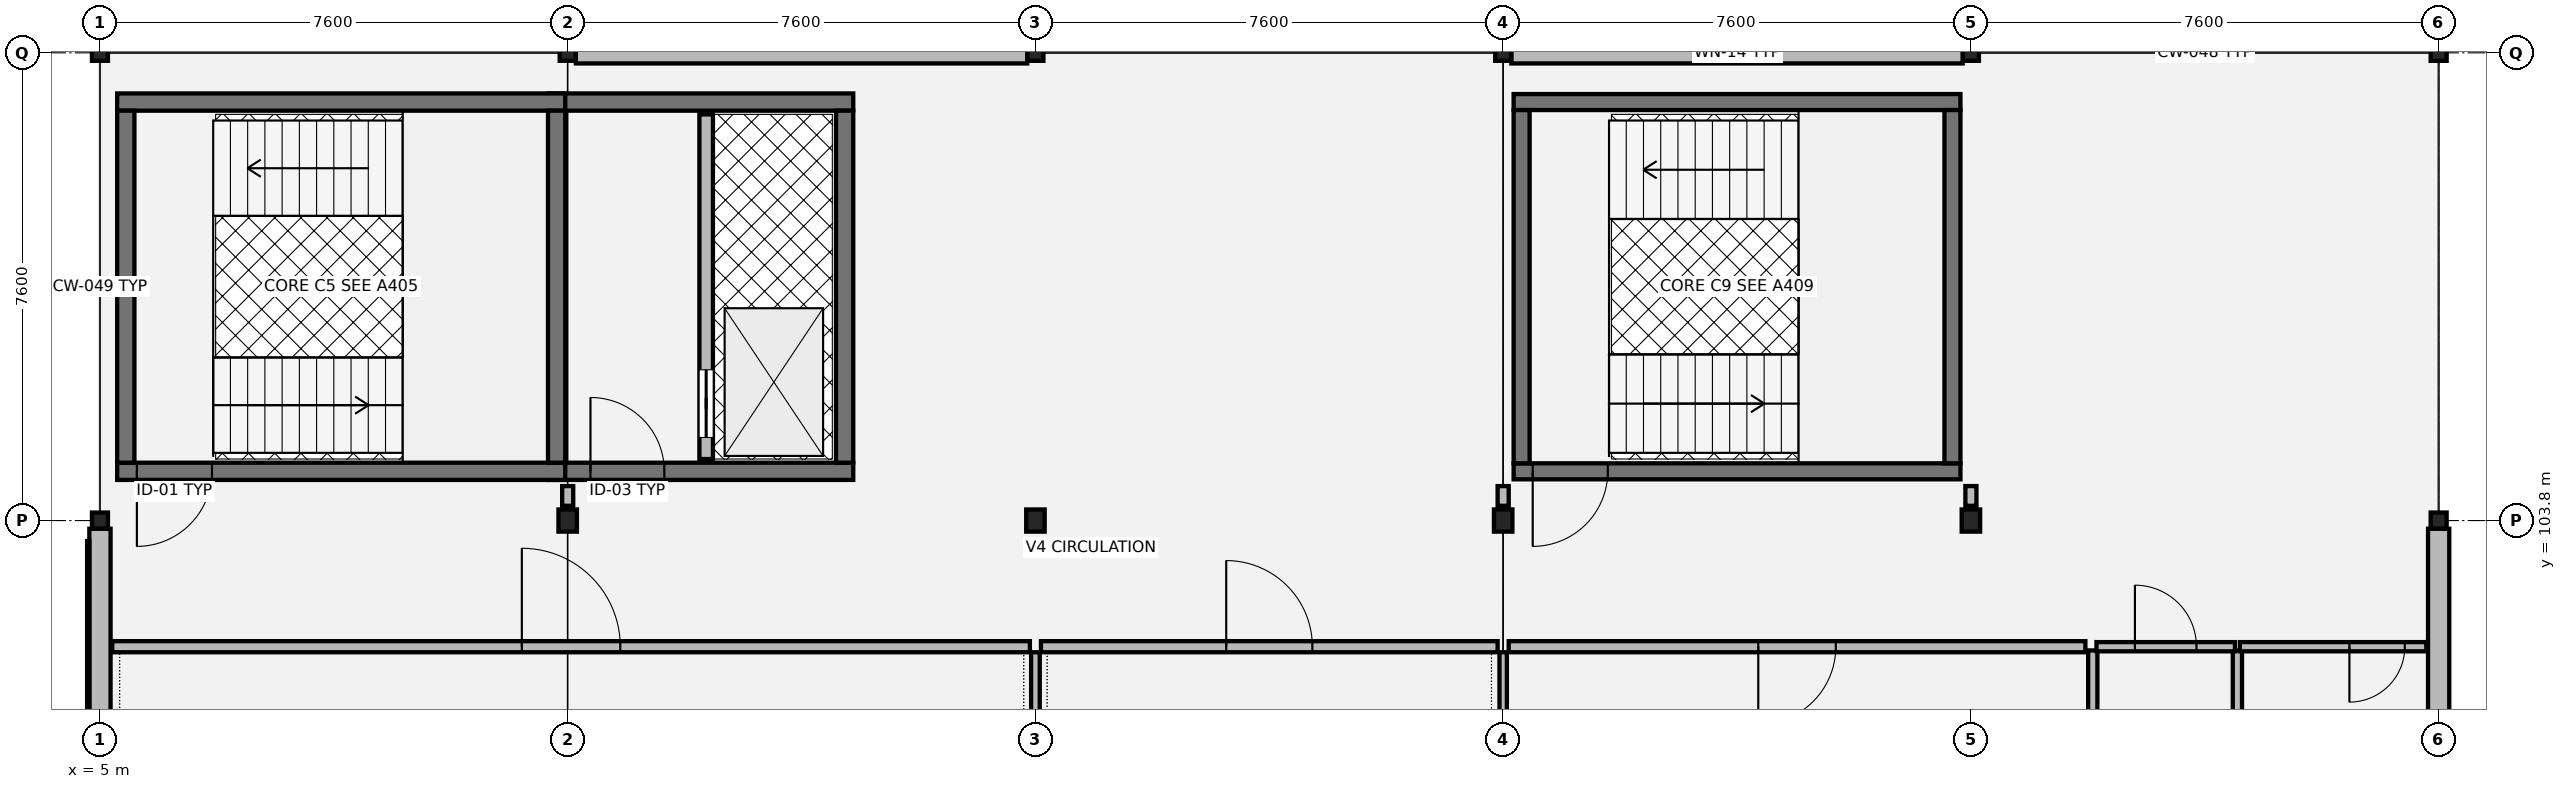
"""IFC4 building model, lengths in metres.
Left out: names, types, materials, properties, quantities, classifications, styles, units other than length and angle.
Written with IfcOpenShell. Run it as: python <this file> out.ifc"""

import sys

from ifc_helpers import new_model, si_unit, direction, frame, frame_2d, origin, origin_2d, place, context, subcontext, project, spatial, rectangle, hollow_rectangle, i_section, extrude, element, fill, save


model = new_model("IFC4")
c1 = context("Model", 3, precision=1e-05, world=origin(), true_north=direction((0.0, 1.0)))
c2 = subcontext(c1, "Body", "Model", "MODEL_VIEW")
j1 = project(units=[si_unit("LENGTHUNIT", "METRE"), si_unit("PLANEANGLEUNIT", "RADIAN")], contexts=[c1])
p1 = place(None, origin())
s1 = spatial("IfcSite", under=j1, at=p1, CompositionType="ELEMENT")
p2 = place(p1, origin())
s2 = spatial("IfcBuilding", under=s1, at=p2, CompositionType="ELEMENT")
p3 = place(p2, frame((0.0, 0.0, 9.18)))
s3 = spatial("IfcBuildingStorey", under=s2, at=p3, CompositionType="ELEMENT", Elevation=9.18)
for number, where, z_axis, x_axis in (
    (1, (5.0, 103.8, 0.0), (0.0, 0.0, 1.0), (1.0, 0.0, 0.0)),
    (2, (5.0, 111.4, 0.0), (0.0, 0.0, 1.0), (1.0, 0.0, 0.0)),
):
    element("IfcColumn", number, at=place(p3, frame(where, z_axis=z_axis, x_axis=x_axis)), inside=s3, PredefinedType="COLUMN", context=c2, shape_type="SweptSolid", body=[
        extrude(hollow_rectangle(XDim=0.26, YDim=0.26, WallThickness=0.012, at=origin_2d()), origin(), (0.0, 0.0, 1.0), 4.055),
    ])
p4 = place(p3, frame((12.6, 103.8, 0.0), z_axis=(0.0, 0.0, 1.0), x_axis=(1.0, 0.0, 0.0)))
e3 = element("IfcColumn", 3, at=p4, inside=s3, PredefinedType="COLUMN", context=c2, shape_type="SweptSolid", body=[
    extrude(i_section(OverallWidth=0.3, OverallDepth=0.36, WebThickness=0.012, FlangeThickness=0.022, at=origin_2d()), origin(), (0.0, 0.0, 1.0), 4.055),
])
p5 = place(p3, frame((12.6, 111.4, 0.0), z_axis=(0.0, 0.0, 1.0), x_axis=(1.0, 0.0, 0.0)))
e4 = element("IfcColumn", 4, at=p5, inside=s3, PredefinedType="COLUMN", context=c2, shape_type="SweptSolid", body=[
    extrude(hollow_rectangle(XDim=0.26, YDim=0.26, WallThickness=0.012, at=origin_2d()), origin(), (0.0, 0.0, 1.0), 4.055),
])
p6 = place(p3, frame((20.2, 103.8, 0.0), z_axis=(0.0, 0.0, 1.0), x_axis=(1.0, 0.0, 0.0)))
e5 = element("IfcColumn", 5, at=p6, inside=s3, PredefinedType="COLUMN", context=c2, shape_type="SweptSolid", body=[
    extrude(i_section(OverallWidth=0.3, OverallDepth=0.36, WebThickness=0.012, FlangeThickness=0.022, at=origin_2d()), origin(), (0.0, 0.0, 1.0), 4.055),
])
p7 = place(p3, frame((20.2, 111.4, 0.0), z_axis=(0.0, 0.0, 1.0), x_axis=(1.0, 0.0, 0.0)))
e6 = element("IfcColumn", 6, at=p7, inside=s3, PredefinedType="COLUMN", context=c2, shape_type="SweptSolid", body=[
    extrude(hollow_rectangle(XDim=0.26, YDim=0.26, WallThickness=0.012, at=origin_2d()), origin(), (0.0, 0.0, 1.0), 4.055),
])
p8 = place(p3, frame((27.8, 103.8, 0.0), z_axis=(0.0, 0.0, 1.0), x_axis=(1.0, 0.0, 0.0)))
e7 = element("IfcColumn", 7, at=p8, inside=s3, PredefinedType="COLUMN", context=c2, shape_type="SweptSolid", body=[
    extrude(i_section(OverallWidth=0.3, OverallDepth=0.36, WebThickness=0.012, FlangeThickness=0.022, at=origin_2d()), origin(), (0.0, 0.0, 1.0), 4.055),
])
p9 = place(p3, frame((27.8, 111.4, 0.0), z_axis=(0.0, 0.0, 1.0), x_axis=(1.0, 0.0, 0.0)))
e8 = element("IfcColumn", 8, at=p9, inside=s3, PredefinedType="COLUMN", context=c2, shape_type="SweptSolid", body=[
    extrude(hollow_rectangle(XDim=0.26, YDim=0.26, WallThickness=0.012, at=origin_2d()), origin(), (0.0, 0.0, 1.0), 4.055),
])
p10 = place(p3, frame((35.4, 103.8, 0.0), z_axis=(0.0, 0.0, 1.0), x_axis=(1.0, 0.0, 0.0)))
e9 = element("IfcColumn", 9, at=p10, inside=s3, PredefinedType="COLUMN", context=c2, shape_type="SweptSolid", body=[
    extrude(i_section(OverallWidth=0.3, OverallDepth=0.36, WebThickness=0.012, FlangeThickness=0.022, at=origin_2d()), origin(), (0.0, 0.0, 1.0), 4.055),
])
for number, where, z_axis, x_axis in (
    (10, (35.4, 111.4, 0.0), (0.0, 0.0, 1.0), (1.0, 0.0, 0.0)),
    (11, (43.0, 103.8, 0.0), (0.0, 0.0, 1.0), (1.0, 0.0, 0.0)),
    (12, (43.0, 111.4, 0.0), (0.0, 0.0, 1.0), (1.0, 0.0, 0.0)),
):
    element("IfcColumn", number, at=place(p3, frame(where, z_axis=z_axis, x_axis=x_axis)), inside=s3, PredefinedType="COLUMN", context=c2, shape_type="SweptSolid", body=[
        extrude(hollow_rectangle(XDim=0.26, YDim=0.26, WallThickness=0.012, at=origin_2d()), origin(), (0.0, 0.0, 1.0), 4.055),
    ])
p11 = place(p3, frame((43.0, 96.333, 0.0), z_axis=(0.0, 0.0, 1.0), x_axis=(0.0, 1.0, 0.0)))
e13 = element("IfcWall", 13, at=p11, inside=s3, PredefinedType="SOLIDWALL", context=c2, shape_type="SweptSolid", body=[
    extrude(rectangle(XDim=7.334, YDim=0.345, at=frame_2d((3.667, 0.0))), origin(), (0.0, 0.0, 1.0), 3.48),
])
p12 = place(p3, frame((35.267, 111.4, 0.0), z_axis=(0.0, 0.0, 1.0), x_axis=(-1.0, 0.0, 0.0)))
e14 = element("IfcWall", 14, at=p12, inside=s3, PredefinedType="SOLIDWALL", context=c2, shape_type="SweptSolid", body=[
    extrude(rectangle(XDim=7.334, YDim=0.345, at=frame_2d((3.667, 0.0))), origin(), (0.0, 0.0, 1.0), 3.48),
])
p13 = place(p12, frame((3.117, 0.0, 0.8)))
e15 = element("IfcOpeningElement", 15, at=p13, cuts=e14, PredefinedType="OPENING", context=c2, shape_type="SweptSolid", body=[
    extrude(rectangle(XDim=1.1, YDim=2.05, at=frame_2d((0.55, 1.025))), frame((0.0, 0.182, 0.0), z_axis=(0.0, -1.0, 0.0), x_axis=(1.0, 0.0, 0.0)), (0.0, 0.0, 1.0), 0.365),
])
for number, where, z_axis, x_axis in (
    (16, (20.067, 111.4, 0.0), (0.0, 0.0, 1.0), (-1.0, 0.0, 0.0)),
    (17, (5.0, 103.667, 0.0), (0.0, 0.0, 1.0), (0.0, -1.0, 0.0)),
):
    element("IfcWall", number, at=place(p3, frame(where, z_axis=z_axis, x_axis=x_axis)), inside=s3, PredefinedType="SOLIDWALL", context=c2, shape_type="SweptSolid", body=[
        extrude(rectangle(XDim=7.334, YDim=0.345, at=frame_2d((3.667, 0.0))), origin(), (0.0, 0.0, 1.0), 3.48),
    ])
p14 = place(p3, frame((12.28, 104.6, 0.0), z_axis=(0.0, 0.0, 1.0), x_axis=(1.0, 0.0, 0.0)))
e18 = element("IfcWall", 18, at=p14, inside=s3, PredefinedType="SHEAR", context=c2, shape_type="SweptSolid", body=[
    extrude(rectangle(XDim=4.96, YDim=0.28, at=frame_2d((2.48, 0.0))), origin(), (0.0, 0.0, 1.0), 3.845),
])
p15 = place(p14, frame((0.69, 0.0, 0.0)))
e19 = element("IfcOpeningElement", 19, at=p15, cuts=e18, PredefinedType="OPENING", context=c2, shape_type="SweptSolid", body=[
    extrude(rectangle(XDim=1.2, YDim=2.16, at=frame_2d((0.6, 1.08))), frame((0.0, 0.15, 0.0), z_axis=(0.0, -1.0, 0.0), x_axis=(1.0, 0.0, 0.0)), (0.0, 0.0, 1.0), 0.3),
])
p16 = place(p3, frame((17.24, 110.6, 0.0), z_axis=(0.0, 0.0, 1.0), x_axis=(-1.0, 0.0, 0.0)))
e20 = element("IfcWall", 20, at=p16, inside=s3, PredefinedType="SHEAR", context=c2, shape_type="SweptSolid", body=[
    extrude(rectangle(XDim=4.96, YDim=0.28, at=frame_2d((2.48, 0.0))), origin(), (0.0, 0.0, 1.0), 3.845),
])
p17 = place(p3, frame((17.1, 104.74, 0.0), z_axis=(0.0, 0.0, 1.0), x_axis=(0.0, 1.0, 0.0)))
e21 = element("IfcWall", 21, at=p17, inside=s3, PredefinedType="SHEAR", context=c2, shape_type="SweptSolid", body=[
    extrude(rectangle(XDim=5.72, YDim=0.28, at=frame_2d((2.86, 0.0))), origin(), (0.0, 0.0, 1.0), 3.845),
])
p18 = place(p3, frame((14.85, 104.8, 0.0), z_axis=(0.0, 0.0, 1.0), x_axis=(0.0, 1.0, 0.0)))
e22 = element("IfcWall", 22, at=p18, inside=s3, PredefinedType="SOLIDWALL", context=c2, shape_type="SweptSolid", body=[
    extrude(rectangle(XDim=5.6, YDim=0.22, at=frame_2d((2.8, 0.0))), origin(), (0.0, 0.0, 1.0), 3.845),
])
p19 = place(p18, frame((0.35, 0.0, 0.0)))
e23 = element("IfcOpeningElement", 23, at=p19, cuts=e22, PredefinedType="OPENING", context=c2, shape_type="SweptSolid", body=[
    extrude(rectangle(XDim=1.1, YDim=2.15, at=frame_2d((0.55, 1.075))), frame((0.0, 0.12, 0.0), z_axis=(0.0, -1.0, 0.0), x_axis=(1.0, 0.0, 0.0)), (0.0, 0.0, 1.0), 0.24),
])
p20 = place(p3, frame((5.28, 104.6, 0.0), z_axis=(0.0, 0.0, 1.0), x_axis=(1.0, 0.0, 0.0)))
e24 = element("IfcWall", 24, at=p20, inside=s3, PredefinedType="SHEAR", context=c2, shape_type="SweptSolid", body=[
    extrude(rectangle(XDim=7.28, YDim=0.28, at=frame_2d((3.64, 0.0))), origin(), (0.0, 0.0, 1.0), 3.845),
])
p21 = place(p20, frame((0.32, 0.0, 0.0)))
e25 = element("IfcOpeningElement", 25, at=p21, cuts=e24, PredefinedType="OPENING", context=c2, shape_type="SweptSolid", body=[
    extrude(rectangle(XDim=1.22, YDim=2.18, at=frame_2d((0.61, 1.09))), frame((0.0, 0.15, 0.0), z_axis=(0.0, -1.0, 0.0), x_axis=(1.0, 0.0, 0.0)), (0.0, 0.0, 1.0), 0.3),
])
p22 = place(p3, frame((5.28, 110.6, 0.0), z_axis=(0.0, 0.0, 1.0), x_axis=(1.0, 0.0, 0.0)))
e26 = element("IfcWall", 26, at=p22, inside=s3, PredefinedType="SHEAR", context=c2, shape_type="SweptSolid", body=[
    extrude(rectangle(XDim=7.28, YDim=0.28, at=frame_2d((3.64, 0.0))), origin(), (0.0, 0.0, 1.0), 3.845),
])
for number, where, z_axis, x_axis in (
    (27, (5.42, 104.74, 0.0), (0.0, 0.0, 1.0), (0.0, 1.0, 0.0)),
    (28, (12.42, 104.74, 0.0), (0.0, 0.0, 1.0), (0.0, 1.0, 0.0)),
):
    element("IfcWall", number, at=place(p3, frame(where, z_axis=z_axis, x_axis=x_axis)), inside=s3, PredefinedType="SHEAR", context=c2, shape_type="SweptSolid", body=[
        extrude(rectangle(XDim=5.72, YDim=0.28, at=frame_2d((2.86, 0.0))), origin(), (0.0, 0.0, 1.0), 3.845),
    ])
p23 = place(p3, frame((27.97, 104.6, 0.0), z_axis=(0.0, 0.0, 1.0), x_axis=(1.0, 0.0, 0.0)))
e29 = element("IfcWall", 29, at=p23, inside=s3, PredefinedType="SHEAR", context=c2, shape_type="SweptSolid", body=[
    extrude(rectangle(XDim=7.26, YDim=0.26, at=frame_2d((3.63, 0.0))), origin(), (0.0, 0.0, 1.0), 3.845),
])
p24 = place(p23, frame((0.31, 0.0, 0.0)))
e30 = element("IfcOpeningElement", 30, at=p24, cuts=e29, PredefinedType="OPENING", context=c2, shape_type="SweptSolid", body=[
    extrude(rectangle(XDim=1.22, YDim=2.18, at=frame_2d((0.61, 1.09))), frame((0.0, 0.14, 0.0), z_axis=(0.0, -1.0, 0.0), x_axis=(1.0, 0.0, 0.0)), (0.0, 0.0, 1.0), 0.28),
])
p25 = place(p3, frame((27.97, 110.6, 0.0), z_axis=(0.0, 0.0, 1.0), x_axis=(1.0, 0.0, 0.0)))
e31 = element("IfcWall", 31, at=p25, inside=s3, PredefinedType="SHEAR", context=c2, shape_type="SweptSolid", body=[
    extrude(rectangle(XDim=7.26, YDim=0.26, at=frame_2d((3.63, 0.0))), origin(), (0.0, 0.0, 1.0), 3.845),
])
for number, where, z_axis, x_axis in (
    (32, (28.1, 104.73, 0.0), (0.0, 0.0, 1.0), (0.0, 1.0, 0.0)),
    (33, (35.1, 104.73, 0.0), (0.0, 0.0, 1.0), (0.0, 1.0, 0.0)),
):
    element("IfcWall", number, at=place(p3, frame(where, z_axis=z_axis, x_axis=x_axis)), inside=s3, PredefinedType="SHEAR", context=c2, shape_type="SweptSolid", body=[
        extrude(rectangle(XDim=5.74, YDim=0.26, at=frame_2d((2.87, 0.0))), origin(), (0.0, 0.0, 1.0), 3.845),
    ])
for number, where, z_axis, x_axis in (
    (34, (37.38, 99.33, 0.0), (0.0, 0.0, 1.0), (0.0, 1.0, 0.0)),
    (35, (39.73, 99.33, 0.0), (0.0, 0.0, 1.0), (0.0, 1.0, 0.0)),
):
    element("IfcWall", number, at=place(p3, frame(where, z_axis=z_axis, x_axis=x_axis)), inside=s3, PredefinedType="PARTITIONING", context=c2, shape_type="SweptSolid", body=[
        extrude(rectangle(XDim=2.36, YDim=0.15, at=frame_2d((1.18, 0.0))), origin(), (0.0, 0.0, 1.0), 3.18),
    ])
p26 = place(p3, frame((37.44, 101.75, 0.0), z_axis=(0.0, 0.0, 1.0), x_axis=(1.0, 0.0, 0.0)))
e36 = element("IfcWall", 36, at=p26, inside=s3, PredefinedType="PARTITIONING", context=c2, shape_type="SweptSolid", body=[
    extrude(rectangle(XDim=2.25, YDim=0.15, at=frame_2d((1.125, 0.0))), origin(), (0.0, 0.0, 1.0), 3.18),
])
p27 = place(p26, frame((0.625, 0.0, 0.0)))
e37 = element("IfcOpeningElement", 37, at=p27, cuts=e36, PredefinedType="OPENING", context=c2, shape_type="SweptSolid", body=[
    extrude(rectangle(XDim=1.0, YDim=2.15, at=frame_2d((0.5, 1.075))), frame((0.0, 0.085, 0.0), z_axis=(0.0, -1.0, 0.0), x_axis=(1.0, 0.0, 0.0)), (0.0, 0.0, 1.0), 0.17),
])
p28 = place(p3, frame((39.77, 101.75, 0.0), z_axis=(0.0, 0.0, 1.0), x_axis=(1.0, 0.0, 0.0)))
e38 = element("IfcWall", 38, at=p28, inside=s3, PredefinedType="PARTITIONING", context=c2, shape_type="SweptSolid", body=[
    extrude(rectangle(XDim=3.03, YDim=0.15, at=frame_2d((1.515, 0.0))), origin(), (0.0, 0.0, 1.0), 3.18),
])
p29 = place(p28, frame((1.78, 0.0, 0.0)))
e39 = element("IfcOpeningElement", 39, at=p29, cuts=e38, PredefinedType="OPENING", context=c2, shape_type="SweptSolid", body=[
    extrude(rectangle(XDim=0.9, YDim=2.15, at=frame_2d((0.45, 1.075))), frame((0.0, 0.085, 0.0), z_axis=(0.0, -1.0, 0.0), x_axis=(1.0, 0.0, 0.0)), (0.0, 0.0, 1.0), 0.17),
])
p30 = place(p3, frame((5.2, 101.75, 0.0), z_axis=(0.0, 0.0, 1.0), x_axis=(1.0, 0.0, 0.0)))
e40 = element("IfcWall", 40, at=p30, inside=s3, PredefinedType="PARTITIONING", context=c2, shape_type="SweptSolid", body=[
    extrude(rectangle(XDim=14.91, YDim=0.18, at=frame_2d((7.455, 0.0))), origin(), (0.0, 0.0, 1.0), 3.18),
])
p31 = place(p30, frame((6.655, 0.0, 0.0)))
e41 = element("IfcOpeningElement", 41, at=p31, cuts=e40, PredefinedType="OPENING", context=c2, shape_type="SweptSolid", body=[
    extrude(rectangle(XDim=1.6, YDim=2.25, at=frame_2d((0.8, 1.125))), frame((0.0, 0.1, 0.0), z_axis=(0.0, -1.0, 0.0), x_axis=(1.0, 0.0, 0.0)), (0.0, 0.0, 1.0), 0.2),
])
p32 = place(p3, frame((20.29, 101.75, 0.0), z_axis=(0.0, 0.0, 1.0), x_axis=(1.0, 0.0, 0.0)))
e42 = element("IfcWall", 42, at=p32, inside=s3, PredefinedType="PARTITIONING", context=c2, shape_type="SweptSolid", body=[
    extrude(rectangle(XDim=7.42, YDim=0.18, at=frame_2d((3.71, 0.0))), origin(), (0.0, 0.0, 1.0), 3.18),
])
p33 = place(p32, frame((3.01, 0.0, 0.0)))
e43 = element("IfcOpeningElement", 43, at=p33, cuts=e42, PredefinedType="OPENING", context=c2, shape_type="SweptSolid", body=[
    extrude(rectangle(XDim=1.4, YDim=2.22, at=frame_2d((0.7, 1.11))), frame((0.0, 0.1, 0.0), z_axis=(0.0, -1.0, 0.0), x_axis=(1.0, 0.0, 0.0)), (0.0, 0.0, 1.0), 0.2),
])
p34 = place(p3, frame((27.89, 101.75, 0.0), z_axis=(0.0, 0.0, 1.0), x_axis=(1.0, 0.0, 0.0)))
e44 = element("IfcWall", 44, at=p34, inside=s3, PredefinedType="PARTITIONING", context=c2, shape_type="SweptSolid", body=[
    extrude(rectangle(XDim=9.37, YDim=0.18, at=frame_2d((4.685, 0.0))), origin(), (0.0, 0.0, 1.0), 3.18),
])
p35 = place(p34, frame((4.055, 0.0, 0.0)))
e45 = element("IfcOpeningElement", 45, at=p35, cuts=e44, PredefinedType="OPENING", context=c2, shape_type="SweptSolid", body=[
    extrude(rectangle(XDim=1.26, YDim=2.2, at=frame_2d((0.63, 1.1))), frame((0.0, 0.1, 0.0), z_axis=(0.0, -1.0, 0.0), x_axis=(1.0, 0.0, 0.0)), (0.0, 0.0, 1.0), 0.2),
])
for number, where, z_axis, x_axis in (
    (46, (12.6, 104.04, 0.0), (0.0, 0.0, 1.0), (0.0, 1.0, 0.0)),
    (47, (27.8, 104.04, 0.0), (0.0, 0.0, 1.0), (0.0, 1.0, 0.0)),
    (48, (35.4, 104.04, 0.0), (0.0, 0.0, 1.0), (0.0, 1.0, 0.0)),
):
    element("IfcWall", number, at=place(p3, frame(where, z_axis=z_axis, x_axis=x_axis)), inside=s3, PredefinedType="PARTITIONING", context=c2, shape_type="SweptSolid", body=[
        extrude(rectangle(XDim=0.32, YDim=0.18, at=frame_2d((0.16, 0.0))), origin(), (0.0, 0.0, 1.0), 3.18),
    ])
p36 = place(p3, frame((20.2, 73.72, 0.0), z_axis=(0.0, 0.0, 1.0), x_axis=(0.0, 1.0, 0.0)))
e49 = element("IfcWall", 49, at=p36, inside=s3, PredefinedType="PARTITIONING", context=c2, shape_type="SweptSolid", body=[
    extrude(rectangle(XDim=27.94, YDim=0.14, at=frame_2d((13.97, 0.0))), origin(), (0.0, 0.0, 1.0), 3.18),
])
p37 = place(p3, frame((27.8, 73.72, 0.0), z_axis=(0.0, 0.0, 1.0), x_axis=(0.0, 1.0, 0.0)))
e50 = element("IfcWall", 50, at=p37, inside=s3, PredefinedType="PARTITIONING", context=c2, shape_type="SweptSolid", body=[
    extrude(rectangle(XDim=27.94, YDim=0.12, at=frame_2d((13.97, 0.0))), origin(), (0.0, 0.0, 1.0), 3.18),
])
p38 = place(p13, origin())
e51 = element("IfcWindow", 51, at=p38, inside=s3, PartitioningType="SINGLE_PANEL", PredefinedType="WINDOW", context=c2, shape_type="SweptSolid", body=[
    extrude(rectangle(XDim=1.1, YDim=2.05, at=frame_2d((0.55, 1.025))), frame((0.0, 0.03, 0.0), z_axis=(0.0, -1.0, 0.0), x_axis=(1.0, 0.0, 0.0)), (0.0, 0.0, 1.0), 0.06),
])
fill(e15, e51)
p39 = place(p15, origin())
e52 = element("IfcDoor", 52, at=p39, inside=s3, OperationType="SINGLE_SWING_LEFT", PredefinedType="DOOR", context=c2, shape_type="SweptSolid", body=[
    extrude(rectangle(XDim=1.2, YDim=2.16, at=frame_2d((0.6, 1.08))), frame((0.0, 0.025, 0.0), z_axis=(0.0, -1.0, 0.0), x_axis=(1.0, 0.0, 0.0)), (0.0, 0.0, 1.0), 0.05),
])
fill(e19, e52)
p40 = place(p19, origin())
e53 = element("IfcDoor", 53, at=p40, inside=s3, OperationType="SLIDING_TO_LEFT", PredefinedType="DOOR", context=c2, shape_type="SweptSolid", body=[
    extrude(rectangle(XDim=1.1, YDim=2.15, at=frame_2d((0.55, 1.075))), frame((0.0, 0.025, 0.0), z_axis=(0.0, -1.0, 0.0), x_axis=(1.0, 0.0, 0.0)), (0.0, 0.0, 1.0), 0.05),
])
fill(e23, e53)
p41 = place(p21, origin())
e54 = element("IfcDoor", 54, at=p41, inside=s3, OperationType="SINGLE_SWING_RIGHT", PredefinedType="DOOR", context=c2, shape_type="SweptSolid", body=[
    extrude(rectangle(XDim=1.22, YDim=2.18, at=frame_2d((0.61, 1.09))), frame((0.0, 0.025, 0.0), z_axis=(0.0, -1.0, 0.0), x_axis=(1.0, 0.0, 0.0)), (0.0, 0.0, 1.0), 0.05),
])
fill(e25, e54)
p42 = place(p24, origin())
e55 = element("IfcDoor", 55, at=p42, inside=s3, OperationType="SINGLE_SWING_RIGHT", PredefinedType="DOOR", context=c2, shape_type="SweptSolid", body=[
    extrude(rectangle(XDim=1.22, YDim=2.18, at=frame_2d((0.61, 1.09))), frame((0.0, 0.025, 0.0), z_axis=(0.0, -1.0, 0.0), x_axis=(1.0, 0.0, 0.0)), (0.0, 0.0, 1.0), 0.05),
])
fill(e30, e55)
p43 = place(p27, origin())
e56 = element("IfcDoor", 56, at=p43, inside=s3, OperationType="SINGLE_SWING_LEFT", PredefinedType="DOOR", context=c2, shape_type="SweptSolid", body=[
    extrude(rectangle(XDim=1.0, YDim=2.15, at=frame_2d((0.5, 1.075))), frame((0.0, 0.025, 0.0), z_axis=(0.0, -1.0, 0.0), x_axis=(1.0, 0.0, 0.0)), (0.0, 0.0, 1.0), 0.05),
])
fill(e37, e56)
p44 = place(p29, origin())
e57 = element("IfcDoor", 57, at=p44, inside=s3, OperationType="SINGLE_SWING_RIGHT", PredefinedType="DOOR", context=c2, shape_type="SweptSolid", body=[
    extrude(rectangle(XDim=0.9, YDim=2.15, at=frame_2d((0.45, 1.075))), frame((0.0, 0.025, 0.0), z_axis=(0.0, -1.0, 0.0), x_axis=(1.0, 0.0, 0.0)), (0.0, 0.0, 1.0), 0.05),
])
fill(e39, e57)
p45 = place(p31, origin())
e58 = element("IfcDoor", 58, at=p45, inside=s3, OperationType="DOUBLE_DOOR_SINGLE_SWING", PredefinedType="DOOR", context=c2, shape_type="SweptSolid", body=[
    extrude(rectangle(XDim=1.6, YDim=2.25, at=frame_2d((0.8, 1.125))), frame((0.0, 0.025, 0.0), z_axis=(0.0, -1.0, 0.0), x_axis=(1.0, 0.0, 0.0)), (0.0, 0.0, 1.0), 0.05),
])
fill(e41, e58)
p46 = place(p33, origin())
e59 = element("IfcDoor", 59, at=p46, inside=s3, OperationType="SINGLE_SWING_LEFT", PredefinedType="DOOR", context=c2, shape_type="SweptSolid", body=[
    extrude(rectangle(XDim=1.4, YDim=2.22, at=frame_2d((0.7, 1.11))), frame((0.0, 0.025, 0.0), z_axis=(0.0, -1.0, 0.0), x_axis=(1.0, 0.0, 0.0)), (0.0, 0.0, 1.0), 0.05),
])
fill(e43, e59)
p47 = place(p35, origin())
e60 = element("IfcDoor", 60, at=p47, inside=s3, OperationType="SINGLE_SWING_RIGHT", PredefinedType="DOOR", context=c2, shape_type="SweptSolid", body=[
    extrude(rectangle(XDim=1.26, YDim=2.2, at=frame_2d((0.63, 1.1))), frame((0.0, 0.025, 0.0), z_axis=(0.0, -1.0, 0.0), x_axis=(1.0, 0.0, 0.0)), (0.0, 0.0, 1.0), 0.05),
])
fill(e45, e60)
save(model, sys.argv[1])
